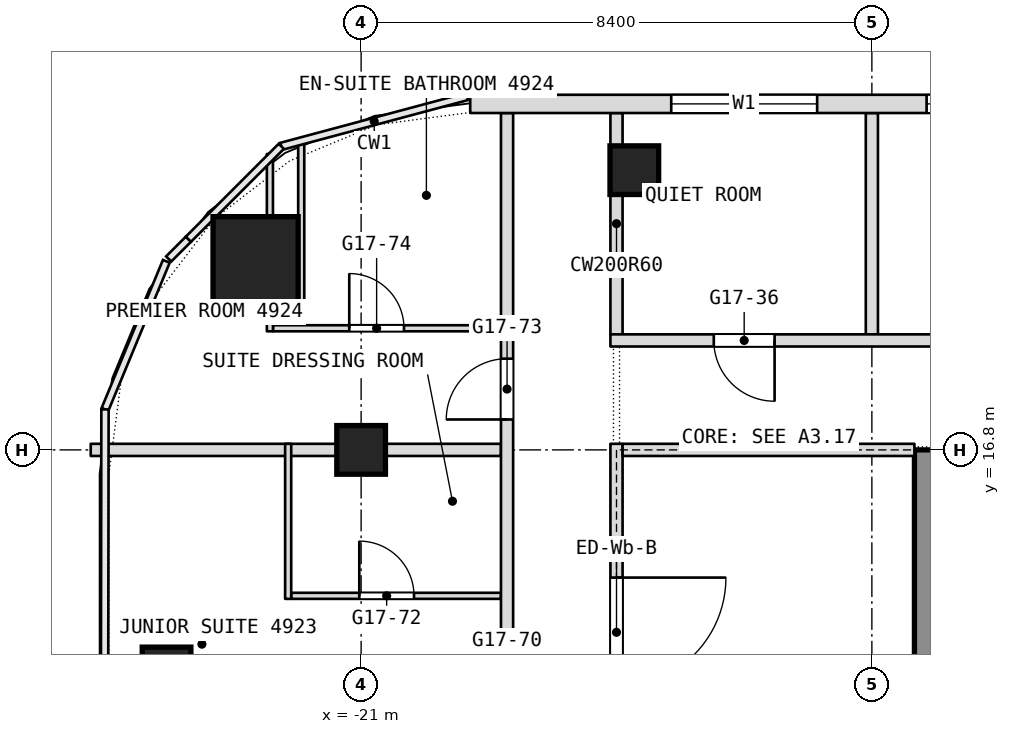
"""IFC4 building model, lengths in metres.
Left out: names, types, materials, properties, quantities, classifications, styles, units other than length and angle.
Written with IfcOpenShell. Run it as: python <this file> out.ifc"""

import sys

from ifc_helpers import new_model, si_unit, direction, frame, frame_2d, origin, origin_2d, place, context, subcontext, project, spatial, rectangle, extrude, element, fill, save


model = new_model("IFC4")
c1 = context("Model", 3, precision=1e-05, world=origin(), true_north=direction((0.0, 1.0)))
c2 = subcontext(c1, "Body", "Model", "MODEL_VIEW")
j1 = project(units=[si_unit("LENGTHUNIT", "METRE"), si_unit("PLANEANGLEUNIT", "RADIAN")], contexts=[c1])
p1 = place(None, origin())
s1 = spatial("IfcSite", under=j1, at=p1, CompositionType="ELEMENT")
p2 = place(p1, origin())
s2 = spatial("IfcBuilding", under=s1, at=p2, CompositionType="ELEMENT")
p3 = place(p2, frame((0.0, 0.0, 212.9)))
s3 = spatial("IfcBuildingStorey", under=s2, at=p3, CompositionType="ELEMENT", Elevation=212.9)
p4 = place(p3, frame((-11.5, 0.0, 0.0), z_axis=(0.0, 0.0, 1.0), x_axis=(0.0, 1.0, 0.0)))
e1 = element("IfcWall", 1, at=p4, inside=s3, PredefinedType="SHEAR", context=c2, shape_type="SweptSolid", body=[
    extrude(rectangle(XDim=16.8, YDim=0.8, at=frame_2d((8.4, 0.0))), origin(), (0.0, 0.0, 1.0), 3.6),
])
p5 = place(p4, frame((1.762, 0.0, 0.0)))
e2 = element("IfcOpeningElement", 2, at=p5, cuts=e1, PredefinedType="OPENING", context=c2, shape_type="SweptSolid", body=[
    extrude(rectangle(XDim=0.9, YDim=2.1, at=frame_2d((0.45, 1.05))), frame((0.0, 0.4, 0.0), z_axis=(0.0, -1.0, 0.0), x_axis=(1.0, 0.0, 0.0)), (0.0, 0.0, 1.0), 0.8),
])
p6 = place(p4, frame((4.387, 0.0, 0.0)))
e3 = element("IfcOpeningElement", 3, at=p6, cuts=e1, PredefinedType="OPENING", context=c2, shape_type="SweptSolid", body=[
    extrude(rectangle(XDim=0.9, YDim=2.1, at=frame_2d((0.45, 1.05))), frame((0.0, 0.4, 0.0), z_axis=(0.0, -1.0, 0.0), x_axis=(1.0, 0.0, 0.0)), (0.0, 0.0, 1.0), 0.8),
])
p7 = place(p4, frame((6.825, 0.0, 0.0)))
e4 = element("IfcOpeningElement", 4, at=p7, cuts=e1, PredefinedType="OPENING", context=c2, shape_type="SweptSolid", body=[
    extrude(rectangle(XDim=1.2, YDim=2.1, at=frame_2d((0.6, 1.05))), frame((0.0, 0.4, 0.0), z_axis=(0.0, -1.0, 0.0), x_axis=(1.0, 0.0, 0.0)), (0.0, 0.0, 1.0), 0.8),
])
p8 = place(p4, frame((12.3, 0.0, 0.0)))
e5 = element("IfcOpeningElement", 5, at=p8, cuts=e1, PredefinedType="OPENING", context=c2, shape_type="SweptSolid", body=[
    extrude(rectangle(XDim=0.9, YDim=2.1, at=frame_2d((0.45, 1.05))), frame((0.0, 0.4, 0.0), z_axis=(0.0, -1.0, 0.0), x_axis=(1.0, 0.0, 0.0)), (0.0, 0.0, 1.0), 0.8),
])
p9 = place(p4, frame((8.775, 0.0, 0.0)))
e6 = element("IfcOpeningElement", 6, at=p9, cuts=e1, PredefinedType="OPENING", context=c2, shape_type="SweptSolid", body=[
    extrude(rectangle(XDim=1.2, YDim=2.1, at=frame_2d((0.6, 1.05))), frame((0.0, 0.4, 0.0), z_axis=(0.0, -1.0, 0.0), x_axis=(1.0, 0.0, 0.0)), (0.0, 0.0, 1.0), 0.8),
])
p10 = place(p3, frame((-22.736, 19.936, 0.0), z_axis=(0.0, 0.0, 1.0), x_axis=(1.0, 0.0, 0.0)))
e7 = element("IfcColumn", 7, at=p10, inside=s3, PredefinedType="COLUMN", context=c2, shape_type="SweptSolid", body=[
    extrude(rectangle(XDim=1.4, YDim=1.4, at=origin_2d()), origin(), (0.0, 0.0, 1.0), 3.6),
])
for number, where, z_axis, x_axis in (
    (8, (-21.0, 16.8, 0.0), (0.0, 0.0, 1.0), (1.0, 0.0, 0.0)),
    (9, (-24.2, 13.156, 0.0), (0.0, 0.0, 1.0), (1.0, 0.0, 0.0)),
    (10, (-16.507, 21.4, 0.0), (0.0, 0.0, 1.0), (1.0, 0.0, 0.0)),
):
    element("IfcColumn", number, at=place(p3, frame(where, z_axis=z_axis, x_axis=x_axis)), inside=s3, PredefinedType="COLUMN", context=c2, shape_type="SweptSolid", body=[
        extrude(rectangle(XDim=0.8, YDim=0.8, at=origin_2d()), origin(), (0.0, 0.0, 1.0), 3.6),
    ])
p11 = place(p3, frame((-12.6, 18.7, 0.0), z_axis=(0.0, 0.0, 1.0), x_axis=(0.0, 1.0, 0.0)))
e11 = element("IfcWall", 11, at=p11, inside=s3, PredefinedType="PARTITIONING", context=c2, shape_type="SweptSolid", body=[
    extrude(rectangle(XDim=3.64, YDim=0.2, at=frame_2d((1.82, 0.0))), origin(), (0.0, 0.0, 1.0), 3.34),
])
p12 = place(p3, frame((-22.15, 14.4, 0.0), z_axis=(0.0, 0.0, 1.0), x_axis=(1.0, 0.0, 0.0)))
e12 = element("IfcWall", 12, at=p12, inside=s3, PredefinedType="PARTITIONING", context=c2, shape_type="SweptSolid", body=[
    extrude(rectangle(XDim=3.45, YDim=0.1, at=frame_2d((1.725, 0.0))), origin(), (0.0, 0.0, 1.0), 3.34),
])
p13 = place(p12, frame((1.12, 0.0, 0.0)))
e13 = element("IfcOpeningElement", 13, at=p13, cuts=e12, PredefinedType="OPENING", context=c2, shape_type="SweptSolid", body=[
    extrude(rectangle(XDim=0.9, YDim=2.1, at=frame_2d((0.45, 1.05))), frame((0.0, 0.05, 0.0), z_axis=(0.0, -1.0, 0.0), x_axis=(1.0, 0.0, 0.0)), (0.0, 0.0, 1.0), 0.1),
])
p14 = place(p3, frame((-16.8, 18.7, 0.0), z_axis=(0.0, 0.0, 1.0), x_axis=(0.0, 1.0, 0.0)))
e14 = element("IfcWall", 14, at=p14, inside=s3, PredefinedType="PARTITIONING", context=c2, shape_type="SweptSolid", body=[
    extrude(rectangle(XDim=3.64, YDim=0.2, at=frame_2d((1.82, 0.0))), origin(), (0.0, 0.0, 1.0), 3.34),
])
p15 = place(p3, frame((-25.447, 16.8, 0.0), z_axis=(0.0, 0.0, 1.0), x_axis=(1.0, 0.0, 0.0)))
e15 = element("IfcWall", 15, at=p15, inside=s3, PredefinedType="PARTITIONING", context=c2, shape_type="SweptSolid", body=[
    extrude(rectangle(XDim=6.747, YDim=0.2, at=frame_2d((3.374, 0.0))), origin(), (0.0, 0.0, 1.0), 2.94),
])
p16 = place(p3, frame((-18.6, -26.751, 0.0), z_axis=(0.0, 0.0, 1.0), x_axis=(0.0, 1.0, 0.0)))
e16 = element("IfcWall", 16, at=p16, inside=s3, PredefinedType="PARTITIONING", context=c2, shape_type="SweptSolid", body=[
    extrude(rectangle(XDim=49.091, YDim=0.2, at=frame_2d((24.545, 0.0))), origin(), (0.0, 0.0, 1.0), 3.34),
])
p17 = place(p16, frame((3.413, 0.0, 0.0)))
e17 = element("IfcOpeningElement", 17, at=p17, cuts=e16, PredefinedType="OPENING", context=c2, shape_type="SweptSolid", body=[
    extrude(rectangle(XDim=1.0, YDim=2.1, at=frame_2d((0.5, 1.05))), frame((0.0, 0.1, 0.0), z_axis=(0.0, -1.0, 0.0), x_axis=(1.0, 0.0, 0.0)), (0.0, 0.0, 1.0), 0.2),
])
p18 = place(p16, frame((5.838, 0.0, 0.0)))
e18 = element("IfcOpeningElement", 18, at=p18, cuts=e16, PredefinedType="OPENING", context=c2, shape_type="SweptSolid", body=[
    extrude(rectangle(XDim=1.0, YDim=2.1, at=frame_2d((0.5, 1.05))), frame((0.0, 0.1, 0.0), z_axis=(0.0, -1.0, 0.0), x_axis=(1.0, 0.0, 0.0)), (0.0, 0.0, 1.0), 0.2),
])
p19 = place(p16, frame((13.551, 0.0, 0.0)))
e19 = element("IfcOpeningElement", 19, at=p19, cuts=e16, PredefinedType="OPENING", context=c2, shape_type="SweptSolid", body=[
    extrude(rectangle(XDim=1.1, YDim=2.1, at=frame_2d((0.55, 1.05))), frame((0.0, 0.1, 0.0), z_axis=(0.0, -1.0, 0.0), x_axis=(1.0, 0.0, 0.0)), (0.0, 0.0, 1.0), 0.2),
])
p20 = place(p16, frame((21.151, 0.0, 0.0)))
e20 = element("IfcOpeningElement", 20, at=p20, cuts=e16, PredefinedType="OPENING", context=c2, shape_type="SweptSolid", body=[
    extrude(rectangle(XDim=1.0, YDim=2.1, at=frame_2d((0.5, 1.05))), frame((0.0, 0.1, 0.0), z_axis=(0.0, -1.0, 0.0), x_axis=(1.0, 0.0, 0.0)), (0.0, 0.0, 1.0), 0.2),
])
p21 = place(p16, frame((22.951, 0.0, 0.0)))
e21 = element("IfcOpeningElement", 21, at=p21, cuts=e16, PredefinedType="OPENING", context=c2, shape_type="SweptSolid", body=[
    extrude(rectangle(XDim=1.0, YDim=2.1, at=frame_2d((0.5, 1.05))), frame((0.0, 0.1, 0.0), z_axis=(0.0, -1.0, 0.0), x_axis=(1.0, 0.0, 0.0)), (0.0, 0.0, 1.0), 0.2),
])
p22 = place(p16, frame((28.301, 0.0, 0.0)))
e22 = element("IfcOpeningElement", 22, at=p22, cuts=e16, PredefinedType="OPENING", context=c2, shape_type="SweptSolid", body=[
    extrude(rectangle(XDim=1.1, YDim=2.1, at=frame_2d((0.55, 1.05))), frame((0.0, 0.1, 0.0), z_axis=(0.0, -1.0, 0.0), x_axis=(1.0, 0.0, 0.0)), (0.0, 0.0, 1.0), 0.2),
])
p23 = place(p16, frame((38.851, 0.0, 0.0)))
e23 = element("IfcOpeningElement", 23, at=p23, cuts=e16, PredefinedType="OPENING", context=c2, shape_type="SweptSolid", body=[
    extrude(rectangle(XDim=1.1, YDim=2.1, at=frame_2d((0.55, 1.05))), frame((0.0, 0.1, 0.0), z_axis=(0.0, -1.0, 0.0), x_axis=(1.0, 0.0, 0.0)), (0.0, 0.0, 1.0), 0.2),
])
p24 = place(p16, frame((44.051, 0.0, 0.0)))
e24 = element("IfcOpeningElement", 24, at=p24, cuts=e16, PredefinedType="OPENING", context=c2, shape_type="SweptSolid", body=[
    extrude(rectangle(XDim=1.0, YDim=2.1, at=frame_2d((0.5, 1.05))), frame((0.0, 0.1, 0.0), z_axis=(0.0, -1.0, 0.0), x_axis=(1.0, 0.0, 0.0)), (0.0, 0.0, 1.0), 0.2),
])
p25 = place(p3, frame((-16.9, 18.6, 0.0), z_axis=(0.0, 0.0, 1.0), x_axis=(1.0, 0.0, 0.0)))
e25 = element("IfcWall", 25, at=p25, inside=s3, PredefinedType="PARTITIONING", context=c2, shape_type="SweptSolid", body=[
    extrude(rectangle(XDim=33.8, YDim=0.2, at=frame_2d((16.9, 0.0))), origin(), (0.0, 0.0, 1.0), 3.34),
])
p26 = place(p25, frame((1.7, 0.0, 0.0)))
e26 = element("IfcOpeningElement", 26, at=p26, cuts=e25, PredefinedType="OPENING", context=c2, shape_type="SweptSolid", body=[
    extrude(rectangle(XDim=1.0, YDim=2.1, at=frame_2d((0.5, 1.05))), frame((0.0, 0.1, 0.0), z_axis=(0.0, -1.0, 0.0), x_axis=(1.0, 0.0, 0.0)), (0.0, 0.0, 1.0), 0.2),
])
p27 = place(p25, frame((7.6, 0.0, 0.0)))
e27 = element("IfcOpeningElement", 27, at=p27, cuts=e25, PredefinedType="OPENING", context=c2, shape_type="SweptSolid", body=[
    extrude(rectangle(XDim=1.8, YDim=2.1, at=frame_2d((0.9, 1.05))), frame((0.0, 0.1, 0.0), z_axis=(0.0, -1.0, 0.0), x_axis=(1.0, 0.0, 0.0)), (0.0, 0.0, 1.0), 0.2),
])
p28 = place(p25, frame((16.0, 0.0, 0.0)))
e28 = element("IfcOpeningElement", 28, at=p28, cuts=e25, PredefinedType="OPENING", context=c2, shape_type="SweptSolid", body=[
    extrude(rectangle(XDim=1.8, YDim=2.1, at=frame_2d((0.9, 1.05))), frame((0.0, 0.1, 0.0), z_axis=(0.0, -1.0, 0.0), x_axis=(1.0, 0.0, 0.0)), (0.0, 0.0, 1.0), 0.2),
])
p29 = place(p25, frame((24.4, 0.0, 0.0)))
e29 = element("IfcOpeningElement", 29, at=p29, cuts=e25, PredefinedType="OPENING", context=c2, shape_type="SweptSolid", body=[
    extrude(rectangle(XDim=1.8, YDim=2.1, at=frame_2d((0.9, 1.05))), frame((0.0, 0.1, 0.0), z_axis=(0.0, -1.0, 0.0), x_axis=(1.0, 0.0, 0.0)), (0.0, 0.0, 1.0), 0.2),
])
p30 = place(p25, frame((31.1, 0.0, 0.0)))
e30 = element("IfcOpeningElement", 30, at=p30, cuts=e25, PredefinedType="OPENING", context=c2, shape_type="SweptSolid", body=[
    extrude(rectangle(XDim=1.0, YDim=2.1, at=frame_2d((0.5, 1.05))), frame((0.0, 0.1, 0.0), z_axis=(0.0, -1.0, 0.0), x_axis=(1.0, 0.0, 0.0)), (0.0, 0.0, 1.0), 0.2),
])
p31 = place(p3, frame((-22.45, 18.8, 0.0), z_axis=(0.0, 0.0, 1.0), x_axis=(1.0, 0.0, 0.0)))
e31 = element("IfcWall", 31, at=p31, inside=s3, PredefinedType="PARTITIONING", context=c2, shape_type="SweptSolid", body=[
    extrude(rectangle(XDim=3.75, YDim=0.1, at=frame_2d((1.875, 0.0))), origin(), (0.0, 0.0, 1.0), 3.34),
])
p32 = place(p31, frame((1.255, 0.0, 0.0)))
e32 = element("IfcOpeningElement", 32, at=p32, cuts=e31, PredefinedType="OPENING", context=c2, shape_type="SweptSolid", body=[
    extrude(rectangle(XDim=0.9, YDim=2.1, at=frame_2d((0.45, 1.05))), frame((0.0, 0.05, 0.0), z_axis=(0.0, -1.0, 0.0), x_axis=(1.0, 0.0, 0.0)), (0.0, 0.0, 1.0), 0.1),
])
p33 = place(p3, frame((-22.2, 14.35, 0.0), z_axis=(0.0, 0.0, 1.0), x_axis=(0.0, 1.0, 0.0)))
e33 = element("IfcWall", 33, at=p33, inside=s3, PredefinedType="PARTITIONING", context=c2, shape_type="SweptSolid", body=[
    extrude(rectangle(XDim=2.55, YDim=0.1, at=frame_2d((1.275, 0.0))), origin(), (0.0, 0.0, 1.0), 3.34),
])
p34 = place(p3, frame((-22.5, 18.75, 0.0), z_axis=(0.0, 0.0, 1.0), x_axis=(0.0, 1.0, 0.0)))
e34 = element("IfcWall", 34, at=p34, inside=s3, PredefinedType="PARTITIONING", context=c2, shape_type="SweptSolid", body=[
    extrude(rectangle(XDim=0.486, YDim=0.1, at=frame_2d((0.243, 0.0))), origin(), (0.0, 0.0, 1.0), 3.34),
])
p35 = place(p3, frame((-22.5, 20.636, 0.0), z_axis=(0.0, 0.0, 1.0), x_axis=(0.0, 1.0, 0.0)))
e35 = element("IfcWall", 35, at=p35, inside=s3, PredefinedType="PARTITIONING", context=c2, shape_type="SweptSolid", body=[
    extrude(rectangle(XDim=1.03, YDim=0.1, at=frame_2d((0.515, 0.0))), origin(), (0.0, 0.0, 1.0), 3.34),
])
p36 = place(p3, frame((-21.985, 19.236, 0.0), z_axis=(0.0, 0.0, 1.0), x_axis=(0.0, 1.0, 0.0)))
e36 = element("IfcWall", 36, at=p36, inside=s3, PredefinedType="PARTITIONING", context=c2, shape_type="SweptSolid", body=[
    extrude(rectangle(XDim=2.614, YDim=0.1, at=frame_2d((1.307, 0.0))), origin(), (0.0, 0.0, 1.0), 3.34),
])
p37 = place(p3, frame((19.206, 22.49, 0.0), z_axis=(0.0, 0.0, 1.0), x_axis=(-1.0, 0.0, 0.0)))
e37 = element("IfcWall", 37, at=p37, inside=s3, PredefinedType="NOTDEFINED", context=c2, shape_type="SweptSolid", body=[
    extrude(rectangle(XDim=38.412, YDim=0.3, at=frame_2d((19.206, 0.0))), origin(), (0.0, 0.0, 1.0), 3.6),
])
p38 = place(p37, frame((3.306, 0.0, 0.9)))
e38 = element("IfcOpeningElement", 38, at=p38, cuts=e37, PredefinedType="OPENING", context=c2, shape_type="SweptSolid", body=[
    extrude(rectangle(XDim=2.4, YDim=2.1, at=frame_2d((1.2, 1.05))), frame((0.0, 0.15, 0.0), z_axis=(0.0, -1.0, 0.0), x_axis=(1.0, 0.0, 0.0)), (0.0, 0.0, 1.0), 0.3),
])
p39 = place(p37, frame((7.506, 0.0, 0.9)))
e39 = element("IfcOpeningElement", 39, at=p39, cuts=e37, PredefinedType="OPENING", context=c2, shape_type="SweptSolid", body=[
    extrude(rectangle(XDim=2.4, YDim=2.1, at=frame_2d((1.2, 1.05))), frame((0.0, 0.15, 0.0), z_axis=(0.0, -1.0, 0.0), x_axis=(1.0, 0.0, 0.0)), (0.0, 0.0, 1.0), 0.3),
])
p40 = place(p37, frame((11.706, 0.0, 0.9)))
e40 = element("IfcOpeningElement", 40, at=p40, cuts=e37, PredefinedType="OPENING", context=c2, shape_type="SweptSolid", body=[
    extrude(rectangle(XDim=2.4, YDim=2.1, at=frame_2d((1.2, 1.05))), frame((0.0, 0.15, 0.0), z_axis=(0.0, -1.0, 0.0), x_axis=(1.0, 0.0, 0.0)), (0.0, 0.0, 1.0), 0.3),
])
p41 = place(p37, frame((15.906, 0.0, 0.9)))
e41 = element("IfcOpeningElement", 41, at=p41, cuts=e37, PredefinedType="OPENING", context=c2, shape_type="SweptSolid", body=[
    extrude(rectangle(XDim=2.4, YDim=2.1, at=frame_2d((1.2, 1.05))), frame((0.0, 0.15, 0.0), z_axis=(0.0, -1.0, 0.0), x_axis=(1.0, 0.0, 0.0)), (0.0, 0.0, 1.0), 0.3),
])
p42 = place(p37, frame((20.106, 0.0, 0.9)))
e42 = element("IfcOpeningElement", 42, at=p42, cuts=e37, PredefinedType="OPENING", context=c2, shape_type="SweptSolid", body=[
    extrude(rectangle(XDim=2.4, YDim=2.1, at=frame_2d((1.2, 1.05))), frame((0.0, 0.15, 0.0), z_axis=(0.0, -1.0, 0.0), x_axis=(1.0, 0.0, 0.0)), (0.0, 0.0, 1.0), 0.3),
])
p43 = place(p37, frame((24.306, 0.0, 0.9)))
e43 = element("IfcOpeningElement", 43, at=p43, cuts=e37, PredefinedType="OPENING", context=c2, shape_type="SweptSolid", body=[
    extrude(rectangle(XDim=2.4, YDim=2.1, at=frame_2d((1.2, 1.05))), frame((0.0, 0.15, 0.0), z_axis=(0.0, -1.0, 0.0), x_axis=(1.0, 0.0, 0.0)), (0.0, 0.0, 1.0), 0.3),
])
p44 = place(p37, frame((28.506, 0.0, 0.9)))
e44 = element("IfcOpeningElement", 44, at=p44, cuts=e37, PredefinedType="OPENING", context=c2, shape_type="SweptSolid", body=[
    extrude(rectangle(XDim=2.4, YDim=2.1, at=frame_2d((1.2, 1.05))), frame((0.0, 0.15, 0.0), z_axis=(0.0, -1.0, 0.0), x_axis=(1.0, 0.0, 0.0)), (0.0, 0.0, 1.0), 0.3),
])
p45 = place(p37, frame((32.706, 0.0, 0.9)))
e45 = element("IfcOpeningElement", 45, at=p45, cuts=e37, PredefinedType="OPENING", context=c2, shape_type="SweptSolid", body=[
    extrude(rectangle(XDim=2.4, YDim=2.1, at=frame_2d((1.2, 1.05))), frame((0.0, 0.15, 0.0), z_axis=(0.0, -1.0, 0.0), x_axis=(1.0, 0.0, 0.0)), (0.0, 0.0, 1.0), 0.3),
])
p46 = place(p3, frame((-16.8, -0.1, 0.0), z_axis=(0.0, 0.0, 1.0), x_axis=(0.0, 1.0, 0.0)))
e46 = element("IfcWall", 46, at=p46, inside=s3, PredefinedType="PARTITIONING", context=c2, shape_type="SweptSolid", body=[
    extrude(rectangle(XDim=17.0, YDim=0.2, at=frame_2d((8.5, 0.0))), origin(), (0.0, 0.0, 1.0), 3.34),
])
p47 = place(p46, frame((2.2, 0.0, 0.0)))
e47 = element("IfcOpeningElement", 47, at=p47, cuts=e46, PredefinedType="OPENING", context=c2, shape_type="SweptSolid", body=[
    extrude(rectangle(XDim=1.8, YDim=2.1, at=frame_2d((0.9, 1.05))), frame((0.0, 0.1, 0.0), z_axis=(0.0, -1.0, 0.0), x_axis=(1.0, 0.0, 0.0)), (0.0, 0.0, 1.0), 0.2),
])
p48 = place(p46, frame((13.0, 0.0, 0.0)))
e48 = element("IfcOpeningElement", 48, at=p48, cuts=e46, PredefinedType="OPENING", context=c2, shape_type="SweptSolid", body=[
    extrude(rectangle(XDim=1.8, YDim=2.1, at=frame_2d((0.9, 1.05))), frame((0.0, 0.1, 0.0), z_axis=(0.0, -1.0, 0.0), x_axis=(1.0, 0.0, 0.0)), (0.0, 0.0, 1.0), 0.2),
])
p49 = place(p3, frame((-16.7, 16.8, 0.0), z_axis=(0.0, 0.0, 1.0), x_axis=(1.0, 0.0, 0.0)))
e49 = element("IfcWall", 49, at=p49, inside=s3, PredefinedType="PARTITIONING", context=c2, shape_type="SweptSolid", body=[
    extrude(rectangle(XDim=4.8, YDim=0.2, at=frame_2d((2.4, 0.0))), origin(), (0.0, 0.0, 1.0), 2.94),
])
p50 = place(p13, origin())
e50 = element("IfcDoor", 50, at=p50, inside=s3, OperationType="SINGLE_SWING_LEFT", PredefinedType="DOOR", context=c2, shape_type="SweptSolid", body=[
    extrude(rectangle(XDim=0.9, YDim=2.1, at=frame_2d((0.45, 1.05))), frame((0.0, 0.025, 0.0), z_axis=(0.0, -1.0, 0.0), x_axis=(1.0, 0.0, 0.0)), (0.0, 0.0, 1.0), 0.05),
])
fill(e13, e50)
p51 = place(p24, origin())
e51 = element("IfcDoor", 51, at=p51, inside=s3, OperationType="SINGLE_SWING_RIGHT", PredefinedType="DOOR", context=c2, shape_type="SweptSolid", body=[
    extrude(rectangle(XDim=1.0, YDim=2.1, at=frame_2d((0.5, 1.05))), frame((0.0, 0.025, 0.0), z_axis=(0.0, -1.0, 0.0), x_axis=(1.0, 0.0, 0.0)), (0.0, 0.0, 1.0), 0.05),
])
fill(e24, e51)
p52 = place(p26, origin())
e52 = element("IfcDoor", 52, at=p52, inside=s3, OperationType="SINGLE_SWING_RIGHT", PredefinedType="DOOR", context=c2, shape_type="SweptSolid", body=[
    extrude(rectangle(XDim=1.0, YDim=2.1, at=frame_2d((0.5, 1.05))), frame((0.0, 0.025, 0.0), z_axis=(0.0, -1.0, 0.0), x_axis=(1.0, 0.0, 0.0)), (0.0, 0.0, 1.0), 0.05),
])
fill(e26, e52)
p53 = place(p32, origin())
e53 = element("IfcDoor", 53, at=p53, inside=s3, OperationType="SINGLE_SWING_LEFT", PredefinedType="DOOR", context=c2, shape_type="SweptSolid", body=[
    extrude(rectangle(XDim=0.9, YDim=2.1, at=frame_2d((0.45, 1.05))), frame((0.0, 0.025, 0.0), z_axis=(0.0, -1.0, 0.0), x_axis=(1.0, 0.0, 0.0)), (0.0, 0.0, 1.0), 0.05),
])
fill(e32, e53)
p54 = place(p44, origin())
e54 = element("IfcWindow", 54, at=p54, inside=s3, PartitioningType="SINGLE_PANEL", PredefinedType="WINDOW", context=c2, shape_type="SweptSolid", body=[
    extrude(rectangle(XDim=2.4, YDim=2.1, at=frame_2d((1.2, 1.05))), frame((0.0, 0.03, 0.0), z_axis=(0.0, -1.0, 0.0), x_axis=(1.0, 0.0, 0.0)), (0.0, 0.0, 1.0), 0.06),
])
fill(e44, e54)
p55 = place(p45, origin())
e55 = element("IfcWindow", 55, at=p55, inside=s3, PartitioningType="SINGLE_PANEL", PredefinedType="WINDOW", context=c2, shape_type="SweptSolid", body=[
    extrude(rectangle(XDim=2.4, YDim=2.1, at=frame_2d((1.2, 1.05))), frame((0.0, 0.03, 0.0), z_axis=(0.0, -1.0, 0.0), x_axis=(1.0, 0.0, 0.0)), (0.0, 0.0, 1.0), 0.06),
])
fill(e45, e55)
p56 = place(p48, origin())
e56 = element("IfcDoor", 56, at=p56, inside=s3, OperationType="DOUBLE_DOOR_SINGLE_SWING", PredefinedType="DOOR", context=c2, shape_type="SweptSolid", body=[
    extrude(rectangle(XDim=1.8, YDim=2.1, at=frame_2d((0.9, 1.05))), frame((0.0, 0.025, 0.0), z_axis=(0.0, -1.0, 0.0), x_axis=(1.0, 0.0, 0.0)), (0.0, 0.0, 1.0), 0.05),
])
fill(e48, e56)
save(model, sys.argv[1])
